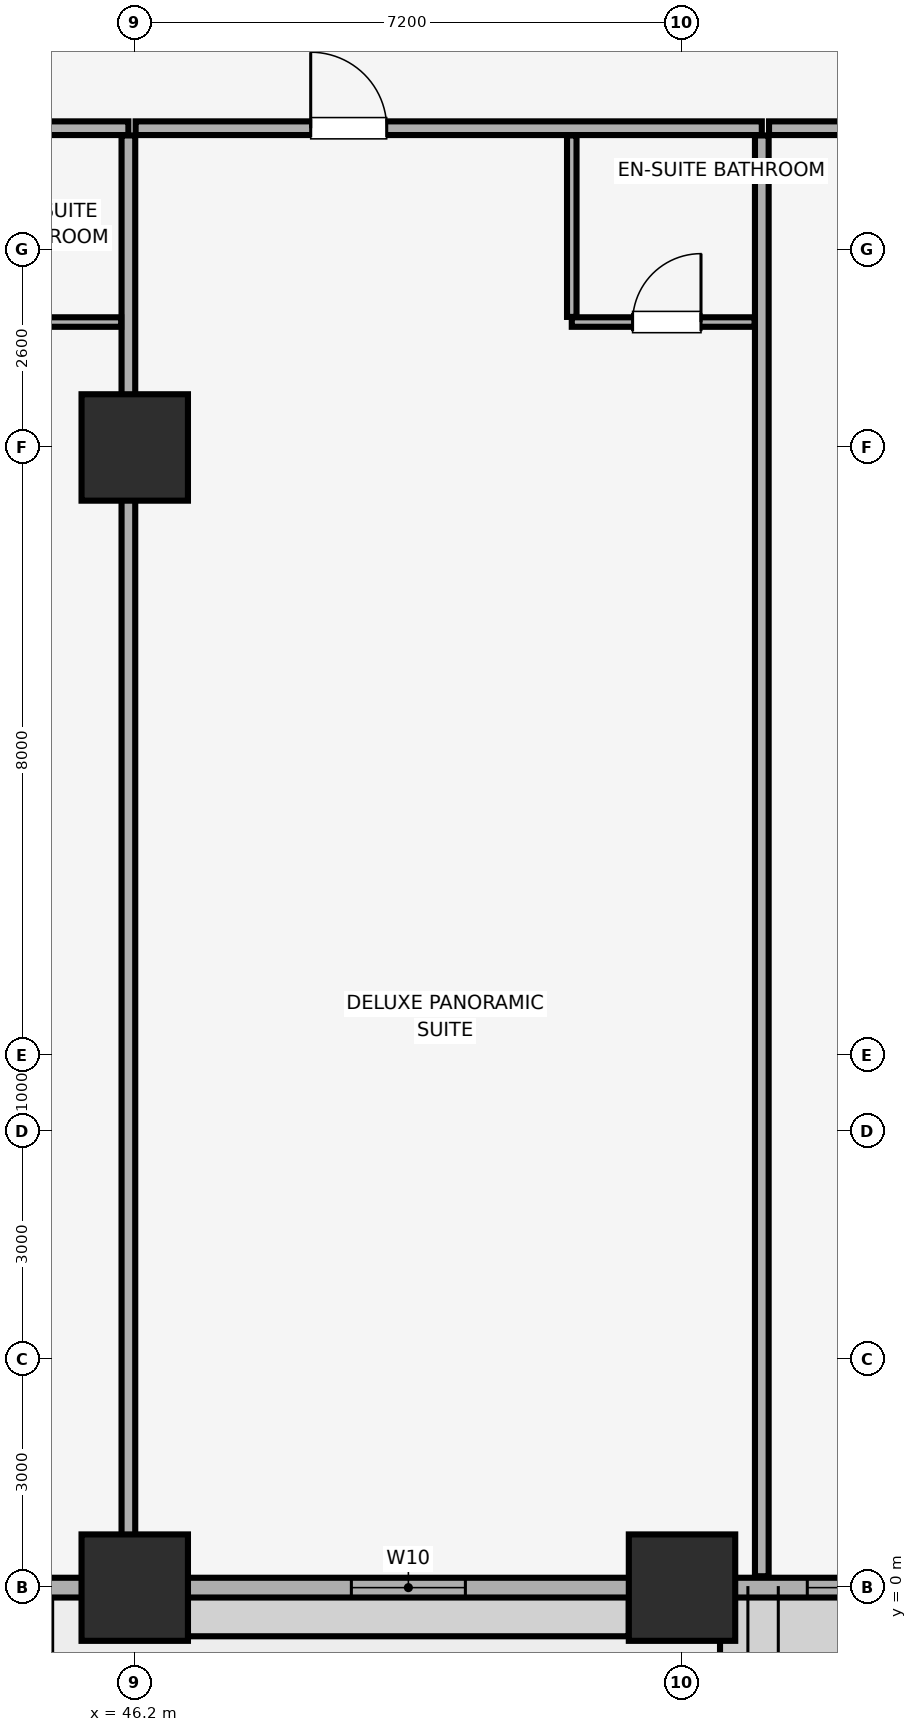
"""IFC4 building model, lengths in metres.
Left out: names, types, materials, properties, quantities, classifications, styles, units other than length and angle.
Written with IfcOpenShell. Run it as: python <this file> out.ifc"""

import sys

from ifc_helpers import new_model, si_unit, direction, frame, frame_2d, origin, origin_2d, place, context, subcontext, project, spatial, rectangle, extrude, element, fill, save


model = new_model("IFC4")
c1 = context("Model", 3, precision=1e-05, world=origin(), true_north=direction((0.0, 1.0)))
c2 = subcontext(c1, "Body", "Model", "MODEL_VIEW")
j1 = project(units=[si_unit("LENGTHUNIT", "METRE"), si_unit("PLANEANGLEUNIT", "RADIAN")], contexts=[c1])
p1 = place(None, origin())
s1 = spatial("IfcSite", under=j1, at=p1, CompositionType="ELEMENT")
p2 = place(p1, origin())
s2 = spatial("IfcBuilding", under=s1, at=p2, CompositionType="ELEMENT")
p3 = place(p2, frame((0.0, 0.0, 76.4)))
s3 = spatial("IfcBuildingStorey", under=s2, at=p3, CompositionType="ELEMENT", Elevation=76.4)
for number, where, z_axis, x_axis in (
    (1, (46.2, 0.0, 0.0), (0.0, 0.0, 1.0), (1.0, 0.0, 0.0)),
    (2, (53.4, 0.0, 0.0), (0.0, 0.0, 1.0), (1.0, 0.0, 0.0)),
    (3, (46.2, 15.0, 0.0), (0.0, 0.0, 1.0), (1.0, 0.0, 0.0)),
):
    element("IfcColumn", number, at=place(p3, frame(where, z_axis=z_axis, x_axis=x_axis)), inside=s3, PredefinedType="COLUMN", context=c2, shape_type="SweptSolid", body=[
        extrude(rectangle(XDim=1.4, YDim=1.4, at=origin_2d()), origin(), (0.0, 0.0, 1.0), 3.4),
    ])
p4 = place(p3, frame((4.2, 0.0, 0.0), z_axis=(0.0, 0.0, 1.0), x_axis=(1.0, 0.0, 0.0)))
e4 = element("IfcWall", 4, at=p4, inside=s3, PredefinedType="SOLIDWALL", context=c2, shape_type="SweptSolid", body=[
    extrude(rectangle(XDim=75.6, YDim=0.26, at=frame_2d((37.8, 0.0))), origin(), (0.0, 0.0, 1.0), 2.45),
])
p5 = place(p4, frame((21.383, 0.0, 0.0)))
e5 = element("IfcOpeningElement", 5, at=p5, cuts=e4, PredefinedType="OPENING", context=c2, shape_type="SweptSolid", body=[
    extrude(rectangle(XDim=1.1, YDim=2.15, at=frame_2d((0.55, 1.075))), frame((0.0, 0.14, 0.0), z_axis=(0.0, -1.0, 0.0), x_axis=(1.0, 0.0, 0.0)), (0.0, 0.0, 1.0), 0.28),
])
p6 = place(p4, frame((37.25, 0.0, 0.0)))
e6 = element("IfcOpeningElement", 6, at=p6, cuts=e4, PredefinedType="OPENING", context=c2, shape_type="SweptSolid", body=[
    extrude(rectangle(XDim=1.1, YDim=2.15, at=frame_2d((0.55, 1.075))), frame((0.0, 0.14, 0.0), z_axis=(0.0, -1.0, 0.0), x_axis=(1.0, 0.0, 0.0)), (0.0, 0.0, 1.0), 0.28),
])
p7 = place(p4, frame((53.117, 0.0, 0.0)))
e7 = element("IfcOpeningElement", 7, at=p7, cuts=e4, PredefinedType="OPENING", context=c2, shape_type="SweptSolid", body=[
    extrude(rectangle(XDim=1.1, YDim=2.15, at=frame_2d((0.55, 1.075))), frame((0.0, 0.14, 0.0), z_axis=(0.0, -1.0, 0.0), x_axis=(1.0, 0.0, 0.0)), (0.0, 0.0, 1.0), 0.28),
])
p8 = place(p4, frame((1.485, 0.0, 0.85)))
e8 = element("IfcOpeningElement", 8, at=p8, cuts=e4, PredefinedType="OPENING", context=c2, shape_type="SweptSolid", body=[
    extrude(rectangle(XDim=1.5, YDim=1.4, at=frame_2d((0.75, 0.7))), frame((0.0, 0.14, 0.0), z_axis=(0.0, -1.0, 0.0), x_axis=(1.0, 0.0, 0.0)), (0.0, 0.0, 1.0), 0.28),
])
p9 = place(p4, frame((6.142, 0.0, 0.85)))
e9 = element("IfcOpeningElement", 9, at=p9, cuts=e4, PredefinedType="OPENING", context=c2, shape_type="SweptSolid", body=[
    extrude(rectangle(XDim=1.5, YDim=1.4, at=frame_2d((0.75, 0.7))), frame((0.0, 0.14, 0.0), z_axis=(0.0, -1.0, 0.0), x_axis=(1.0, 0.0, 0.0)), (0.0, 0.0, 1.0), 0.28),
])
p10 = place(p4, frame((9.342, 0.0, 0.85)))
e10 = element("IfcOpeningElement", 10, at=p10, cuts=e4, PredefinedType="OPENING", context=c2, shape_type="SweptSolid", body=[
    extrude(rectangle(XDim=1.5, YDim=1.4, at=frame_2d((0.75, 0.7))), frame((0.0, 0.14, 0.0), z_axis=(0.0, -1.0, 0.0), x_axis=(1.0, 0.0, 0.0)), (0.0, 0.0, 1.0), 0.28),
])
p11 = place(p4, frame((13.908, 0.0, 0.85)))
e11 = element("IfcOpeningElement", 11, at=p11, cuts=e4, PredefinedType="OPENING", context=c2, shape_type="SweptSolid", body=[
    extrude(rectangle(XDim=1.5, YDim=1.4, at=frame_2d((0.75, 0.7))), frame((0.0, 0.14, 0.0), z_axis=(0.0, -1.0, 0.0), x_axis=(1.0, 0.0, 0.0)), (0.0, 0.0, 1.0), 0.28),
])
p12 = place(p4, frame((23.202, 0.0, 0.85)))
e12 = element("IfcOpeningElement", 12, at=p12, cuts=e4, PredefinedType="OPENING", context=c2, shape_type="SweptSolid", body=[
    extrude(rectangle(XDim=1.5, YDim=1.4, at=frame_2d((0.75, 0.7))), frame((0.0, 0.14, 0.0), z_axis=(0.0, -1.0, 0.0), x_axis=(1.0, 0.0, 0.0)), (0.0, 0.0, 1.0), 0.28),
])
p13 = place(p4, frame((29.25, 0.0, 0.85)))
e13 = element("IfcOpeningElement", 13, at=p13, cuts=e4, PredefinedType="OPENING", context=c2, shape_type="SweptSolid", body=[
    extrude(rectangle(XDim=1.5, YDim=1.4, at=frame_2d((0.75, 0.7))), frame((0.0, 0.14, 0.0), z_axis=(0.0, -1.0, 0.0), x_axis=(1.0, 0.0, 0.0)), (0.0, 0.0, 1.0), 0.28),
])
p14 = place(p4, frame((34.79, 0.0, 0.85)))
e14 = element("IfcOpeningElement", 14, at=p14, cuts=e4, PredefinedType="OPENING", context=c2, shape_type="SweptSolid", body=[
    extrude(rectangle(XDim=1.5, YDim=1.4, at=frame_2d((0.75, 0.7))), frame((0.0, 0.14, 0.0), z_axis=(0.0, -1.0, 0.0), x_axis=(1.0, 0.0, 0.0)), (0.0, 0.0, 1.0), 0.28),
])
p15 = place(p4, frame((39.31, 0.0, 0.85)))
e15 = element("IfcOpeningElement", 15, at=p15, cuts=e4, PredefinedType="OPENING", context=c2, shape_type="SweptSolid", body=[
    extrude(rectangle(XDim=1.5, YDim=1.4, at=frame_2d((0.75, 0.7))), frame((0.0, 0.14, 0.0), z_axis=(0.0, -1.0, 0.0), x_axis=(1.0, 0.0, 0.0)), (0.0, 0.0, 1.0), 0.28),
])
p16 = place(p4, frame((44.85, 0.0, 0.85)))
e16 = element("IfcOpeningElement", 16, at=p16, cuts=e4, PredefinedType="OPENING", context=c2, shape_type="SweptSolid", body=[
    extrude(rectangle(XDim=1.5, YDim=1.4, at=frame_2d((0.75, 0.7))), frame((0.0, 0.14, 0.0), z_axis=(0.0, -1.0, 0.0), x_axis=(1.0, 0.0, 0.0)), (0.0, 0.0, 1.0), 0.28),
])
p17 = place(p4, frame((50.848, 0.0, 0.85)))
e17 = element("IfcOpeningElement", 17, at=p17, cuts=e4, PredefinedType="OPENING", context=c2, shape_type="SweptSolid", body=[
    extrude(rectangle(XDim=1.5, YDim=1.4, at=frame_2d((0.75, 0.7))), frame((0.0, 0.14, 0.0), z_axis=(0.0, -1.0, 0.0), x_axis=(1.0, 0.0, 0.0)), (0.0, 0.0, 1.0), 0.28),
])
p18 = place(p4, frame((60.142, 0.0, 0.85)))
e18 = element("IfcOpeningElement", 18, at=p18, cuts=e4, PredefinedType="OPENING", context=c2, shape_type="SweptSolid", body=[
    extrude(rectangle(XDim=1.5, YDim=1.4, at=frame_2d((0.75, 0.7))), frame((0.0, 0.14, 0.0), z_axis=(0.0, -1.0, 0.0), x_axis=(1.0, 0.0, 0.0)), (0.0, 0.0, 1.0), 0.28),
])
p19 = place(p4, frame((64.708, 0.0, 0.85)))
e19 = element("IfcOpeningElement", 19, at=p19, cuts=e4, PredefinedType="OPENING", context=c2, shape_type="SweptSolid", body=[
    extrude(rectangle(XDim=1.5, YDim=1.4, at=frame_2d((0.75, 0.7))), frame((0.0, 0.14, 0.0), z_axis=(0.0, -1.0, 0.0), x_axis=(1.0, 0.0, 0.0)), (0.0, 0.0, 1.0), 0.28),
])
p20 = place(p4, frame((67.908, 0.0, 0.85)))
e20 = element("IfcOpeningElement", 20, at=p20, cuts=e4, PredefinedType="OPENING", context=c2, shape_type="SweptSolid", body=[
    extrude(rectangle(XDim=1.5, YDim=1.4, at=frame_2d((0.75, 0.7))), frame((0.0, 0.14, 0.0), z_axis=(0.0, -1.0, 0.0), x_axis=(1.0, 0.0, 0.0)), (0.0, 0.0, 1.0), 0.28),
])
p21 = place(p4, frame((72.615, 0.0, 0.85)))
e21 = element("IfcOpeningElement", 21, at=p21, cuts=e4, PredefinedType="OPENING", context=c2, shape_type="SweptSolid", body=[
    extrude(rectangle(XDim=1.5, YDim=1.4, at=frame_2d((0.75, 0.7))), frame((0.0, 0.14, 0.0), z_axis=(0.0, -1.0, 0.0), x_axis=(1.0, 0.0, 0.0)), (0.0, 0.0, 1.0), 0.28),
])
p22 = place(p3, frame((37.878, 19.2, 0.0), z_axis=(0.0, 0.0, 1.0), x_axis=(1.0, 0.0, 0.0)))
e22 = element("IfcWall", 22, at=p22, inside=s3, PredefinedType="PARTITIONING", context=c2, shape_type="SweptSolid", body=[
    extrude(rectangle(XDim=8.238, YDim=0.18, at=frame_2d((4.119, 0.0))), origin(), (0.0, 0.0, 1.0), 3.4),
])
p23 = place(p22, frame((2.27, 0.0, 0.0)))
e23 = element("IfcOpeningElement", 23, at=p23, cuts=e22, PredefinedType="OPENING", context=c2, shape_type="SweptSolid", body=[
    extrude(rectangle(XDim=1.0, YDim=2.15, at=frame_2d((0.5, 1.075))), frame((0.0, 0.1, 0.0), z_axis=(0.0, -1.0, 0.0), x_axis=(1.0, 0.0, 0.0)), (0.0, 0.0, 1.0), 0.2),
])
p24 = place(p3, frame((46.116, 0.15, 0.0), z_axis=(0.0, 0.0, 1.0), x_axis=(0.0, 1.0, 0.0)))
e24 = element("IfcWall", 24, at=p24, inside=s3, PredefinedType="PARTITIONING", context=c2, shape_type="SweptSolid", body=[
    extrude(rectangle(XDim=18.955, YDim=0.18, at=frame_2d((9.478, 0.0))), origin(), (0.0, 0.0, 1.0), 2.8),
])
p25 = place(p3, frame((43.616, 16.65, 0.0), z_axis=(0.0, 0.0, 1.0), x_axis=(1.0, 0.0, 0.0)))
e25 = element("IfcWall", 25, at=p25, inside=s3, PredefinedType="PARTITIONING", context=c2, shape_type="SweptSolid", body=[
    extrude(rectangle(XDim=2.405, YDim=0.125, at=frame_2d((1.203, 0.0))), origin(), (0.0, 0.0, 1.0), 3.4),
])
p26 = place(p3, frame((46.211, 19.2, 0.0), z_axis=(0.0, 0.0, 1.0), x_axis=(1.0, 0.0, 0.0)))
e26 = element("IfcWall", 26, at=p26, inside=s3, PredefinedType="PARTITIONING", context=c2, shape_type="SweptSolid", body=[
    extrude(rectangle(XDim=8.238, YDim=0.18, at=frame_2d((4.119, 0.0))), origin(), (0.0, 0.0, 1.0), 3.4),
])
p27 = place(p26, frame((2.303, 0.0, 0.0)))
e27 = element("IfcOpeningElement", 27, at=p27, cuts=e26, PredefinedType="OPENING", context=c2, shape_type="SweptSolid", body=[
    extrude(rectangle(XDim=1.0, YDim=2.15, at=frame_2d((0.5, 1.075))), frame((0.0, 0.1, 0.0), z_axis=(0.0, -1.0, 0.0), x_axis=(1.0, 0.0, 0.0)), (0.0, 0.0, 1.0), 0.2),
])
p28 = place(p3, frame((54.45, 0.15, 0.0), z_axis=(0.0, 0.0, 1.0), x_axis=(0.0, 1.0, 0.0)))
e28 = element("IfcWall", 28, at=p28, inside=s3, PredefinedType="PARTITIONING", context=c2, shape_type="SweptSolid", body=[
    extrude(rectangle(XDim=18.955, YDim=0.18, at=frame_2d((9.478, 0.0))), origin(), (0.0, 0.0, 1.0), 3.4),
])
p29 = place(p3, frame((51.95, 16.65, 0.0), z_axis=(0.0, 0.0, 1.0), x_axis=(1.0, 0.0, 0.0)))
e29 = element("IfcWall", 29, at=p29, inside=s3, PredefinedType="PARTITIONING", context=c2, shape_type="SweptSolid", body=[
    extrude(rectangle(XDim=2.405, YDim=0.125, at=frame_2d((1.203, 0.0))), origin(), (0.0, 0.0, 1.0), 3.4),
])
p30 = place(p29, frame((0.8, 0.0, 0.0)))
e30 = element("IfcOpeningElement", 30, at=p30, cuts=e29, PredefinedType="OPENING", context=c2, shape_type="SweptSolid", body=[
    extrude(rectangle(XDim=0.9, YDim=2.1, at=frame_2d((0.45, 1.05))), frame((0.0, 0.073, 0.0), z_axis=(0.0, -1.0, 0.0), x_axis=(1.0, 0.0, 0.0)), (0.0, 0.0, 1.0), 0.145),
])
p31 = place(p3, frame((51.95, 16.718, 0.0), z_axis=(0.0, 0.0, 1.0), x_axis=(0.0, 1.0, 0.0)))
e31 = element("IfcWall", 31, at=p31, inside=s3, PredefinedType="PARTITIONING", context=c2, shape_type="SweptSolid", body=[
    extrude(rectangle(XDim=2.387, YDim=0.125, at=frame_2d((1.194, 0.0))), origin(), (0.0, 0.0, 1.0), 3.4),
])
p32 = place(p3, frame((54.545, 19.2, 0.0), z_axis=(0.0, 0.0, 1.0), x_axis=(1.0, 0.0, 0.0)))
e32 = element("IfcWall", 32, at=p32, inside=s3, PredefinedType="PARTITIONING", context=c2, shape_type="SweptSolid", body=[
    extrude(rectangle(XDim=8.238, YDim=0.18, at=frame_2d((4.119, 0.0))), origin(), (0.0, 0.0, 1.0), 3.4),
])
p33 = place(p32, frame((1.872, 0.0, 0.0)))
e33 = element("IfcOpeningElement", 33, at=p33, cuts=e32, PredefinedType="OPENING", context=c2, shape_type="SweptSolid", body=[
    extrude(rectangle(XDim=1.0, YDim=2.15, at=frame_2d((0.5, 1.075))), frame((0.0, 0.1, 0.0), z_axis=(0.0, -1.0, 0.0), x_axis=(1.0, 0.0, 0.0)), (0.0, 0.0, 1.0), 0.2),
])
p34 = place(p16, origin())
e34 = element("IfcWindow", 34, at=p34, inside=s3, PartitioningType="SINGLE_PANEL", PredefinedType="WINDOW", context=c2, shape_type="SweptSolid", body=[
    extrude(rectangle(XDim=1.5, YDim=1.4, at=frame_2d((0.75, 0.7))), frame((0.0, 0.03, 0.0), z_axis=(0.0, -1.0, 0.0), x_axis=(1.0, 0.0, 0.0)), (0.0, 0.0, 1.0), 0.06),
])
fill(e16, e34)
p35 = place(p17, origin())
e35 = element("IfcWindow", 35, at=p35, inside=s3, PartitioningType="SINGLE_PANEL", PredefinedType="WINDOW", context=c2, shape_type="SweptSolid", body=[
    extrude(rectangle(XDim=1.5, YDim=1.4, at=frame_2d((0.75, 0.7))), frame((0.0, 0.03, 0.0), z_axis=(0.0, -1.0, 0.0), x_axis=(1.0, 0.0, 0.0)), (0.0, 0.0, 1.0), 0.06),
])
fill(e17, e35)
p36 = place(p27, origin())
e36 = element("IfcDoor", 36, at=p36, inside=s3, OperationType="SINGLE_SWING_LEFT", PredefinedType="DOOR", context=c2, shape_type="SweptSolid", body=[
    extrude(rectangle(XDim=1.0, YDim=2.15, at=frame_2d((0.5, 1.075))), frame((0.0, 0.025, 0.0), z_axis=(0.0, -1.0, 0.0), x_axis=(1.0, 0.0, 0.0)), (0.0, 0.0, 1.0), 0.05),
])
fill(e27, e36)
p37 = place(p30, origin())
e37 = element("IfcDoor", 37, at=p37, inside=s3, OperationType="SINGLE_SWING_RIGHT", PredefinedType="DOOR", context=c2, shape_type="SweptSolid", body=[
    extrude(rectangle(XDim=0.9, YDim=2.1, at=frame_2d((0.45, 1.05))), frame((0.0, 0.025, 0.0), z_axis=(0.0, -1.0, 0.0), x_axis=(1.0, 0.0, 0.0)), (0.0, 0.0, 1.0), 0.05),
])
fill(e30, e37)
save(model, sys.argv[1])
